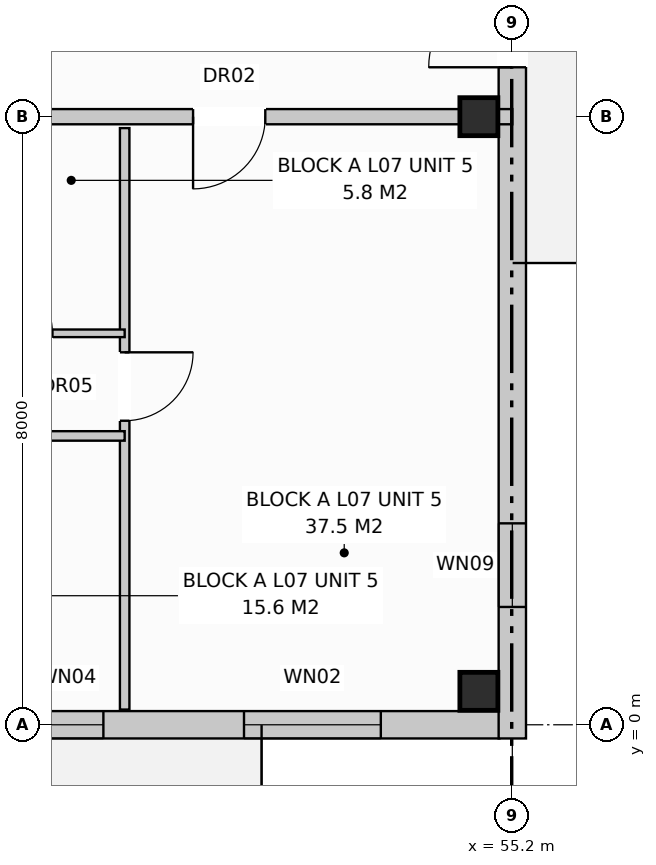
"""IFC4 building model, lengths in metres.
Left out: names, types, materials, properties, quantities, classifications, styles, units other than length and angle.
Written with IfcOpenShell. Run it as: python <this file> out.ifc"""

import sys

from ifc_helpers import new_model, si_unit, direction, frame, frame_2d, origin, origin_with_axes, origin_2d, place, context, subcontext, project, spatial, rectangle, extrude, element, fill, save


model = new_model("IFC4")
c1 = context("Model", 3, precision=1e-05, world=origin(), true_north=direction((0.0, 1.0)))
c2 = subcontext(c1, "Body", "Model", "MODEL_VIEW")
j1 = project(units=[si_unit("LENGTHUNIT", "METRE"), si_unit("PLANEANGLEUNIT", "RADIAN")], contexts=[c1])
p1 = place(None, origin())
s1 = spatial("IfcSite", under=j1, at=p1, CompositionType="ELEMENT")
p2 = place(p1, origin())
s2 = spatial("IfcBuilding", under=s1, at=p2, CompositionType="ELEMENT")
p3 = place(p2, frame((0.0, 0.0, 24.0)))
s3 = spatial("IfcBuildingStorey", under=s2, at=p3, CompositionType="ELEMENT", Elevation=24.0)
for number, where, z_axis, x_axis in (
    (1, (54.76, 0.44, 0.0), (0.0, 0.0, 1.0), (1.0, 0.0, 0.0)),
    (2, (54.76, 8.0, 0.0), (0.0, 0.0, 1.0), (1.0, 0.0, 0.0)),
):
    element("IfcColumn", number, at=place(p3, frame(where, z_axis=z_axis, x_axis=x_axis)), inside=s3, PredefinedType="COLUMN", context=c2, shape_type="SweptSolid", body=[
        extrude(rectangle(XDim=0.5, YDim=0.5, at=origin_2d()), origin(), (0.0, 0.0, 1.0), 3.2),
    ])
p4 = place(p3, frame((0.17, 0.0, 0.0), z_axis=(0.0, 0.0, 1.0), x_axis=(1.0, 0.0, 0.0)))
e3 = element("IfcWall", 3, at=p4, inside=s3, PredefinedType="STANDARD", context=c2, shape_type="SweptSolid", body=[
    extrude(rectangle(XDim=54.86, YDim=0.36, at=frame_2d((27.43, 0.0))), origin(), (0.0, 0.0, 1.0), 2.95),
])
p5 = place(p4, frame((2.5, 0.0, 0.0)))
e4 = element("IfcOpeningElement", 4, at=p5, cuts=e3, PredefinedType="OPENING", context=c2, shape_type="SweptSolid", body=[
    extrude(rectangle(XDim=0.95, YDim=2.1, at=frame_2d((0.475, 1.05))), frame((0.0, 0.192, 0.0), z_axis=(0.0, -1.0, 0.0), x_axis=(1.0, 0.0, 0.0)), (0.0, 0.0, 1.0), 0.384),
])
p6 = place(p4, frame((17.0, 0.0, 0.0)))
e5 = element("IfcOpeningElement", 5, at=p6, cuts=e3, PredefinedType="OPENING", context=c2, shape_type="SweptSolid", body=[
    extrude(rectangle(XDim=0.95, YDim=2.1, at=frame_2d((0.475, 1.05))), frame((0.0, 0.192, 0.0), z_axis=(0.0, -1.0, 0.0), x_axis=(1.0, 0.0, 0.0)), (0.0, 0.0, 1.0), 0.384),
])
p7 = place(p4, frame((30.1, 0.0, 0.0)))
e6 = element("IfcOpeningElement", 6, at=p7, cuts=e3, PredefinedType="OPENING", context=c2, shape_type="SweptSolid", body=[
    extrude(rectangle(XDim=0.95, YDim=2.1, at=frame_2d((0.475, 1.05))), frame((0.0, 0.192, 0.0), z_axis=(0.0, -1.0, 0.0), x_axis=(1.0, 0.0, 0.0)), (0.0, 0.0, 1.0), 0.384),
])
p8 = place(p4, frame((46.5, 0.0, 0.0)))
e7 = element("IfcOpeningElement", 7, at=p8, cuts=e3, PredefinedType="OPENING", context=c2, shape_type="SweptSolid", body=[
    extrude(rectangle(XDim=0.95, YDim=2.1, at=frame_2d((0.475, 1.05))), frame((0.0, 0.192, 0.0), z_axis=(0.0, -1.0, 0.0), x_axis=(1.0, 0.0, 0.0)), (0.0, 0.0, 1.0), 0.384),
])
p9 = place(p4, frame((0.75, 0.0, 0.72)))
e8 = element("IfcOpeningElement", 8, at=p9, cuts=e3, PredefinedType="OPENING", context=c2, shape_type="SweptSolid", body=[
    extrude(rectangle(XDim=1.1, YDim=1.5, at=frame_2d((0.55, 0.75))), frame((0.0, 0.192, 0.0), z_axis=(0.0, -1.0, 0.0), x_axis=(1.0, 0.0, 0.0)), (0.0, 0.0, 1.0), 0.384),
])
p10 = place(p4, frame((4.25, 0.0, 0.72)))
e9 = element("IfcOpeningElement", 9, at=p10, cuts=e3, PredefinedType="OPENING", context=c2, shape_type="SweptSolid", body=[
    extrude(rectangle(XDim=1.9, YDim=1.85, at=frame_2d((0.95, 0.925))), frame((0.0, 0.192, 0.0), z_axis=(0.0, -1.0, 0.0), x_axis=(1.0, 0.0, 0.0)), (0.0, 0.0, 1.0), 0.384),
])
p11 = place(p4, frame((8.925, 0.0, 0.8)))
e10 = element("IfcOpeningElement", 10, at=p11, cuts=e3, PredefinedType="OPENING", context=c2, shape_type="SweptSolid", body=[
    extrude(rectangle(XDim=1.95, YDim=1.65, at=frame_2d((0.975, 0.825))), frame((0.0, 0.192, 0.0), z_axis=(0.0, -1.0, 0.0), x_axis=(1.0, 0.0, 0.0)), (0.0, 0.0, 1.0), 0.384),
])
p12 = place(p4, frame((15.05, 0.0, 0.72)))
e11 = element("IfcOpeningElement", 11, at=p12, cuts=e3, PredefinedType="OPENING", context=c2, shape_type="SweptSolid", body=[
    extrude(rectangle(XDim=1.1, YDim=1.5, at=frame_2d((0.55, 0.75))), frame((0.0, 0.192, 0.0), z_axis=(0.0, -1.0, 0.0), x_axis=(1.0, 0.0, 0.0)), (0.0, 0.0, 1.0), 0.384),
])
p13 = place(p4, frame((21.05, 0.0, 0.72)))
e12 = element("IfcOpeningElement", 12, at=p13, cuts=e3, PredefinedType="OPENING", context=c2, shape_type="SweptSolid", body=[
    extrude(rectangle(XDim=1.9, YDim=1.85, at=frame_2d((0.95, 0.925))), frame((0.0, 0.192, 0.0), z_axis=(0.0, -1.0, 0.0), x_axis=(1.0, 0.0, 0.0)), (0.0, 0.0, 1.0), 0.384),
])
p14 = place(p4, frame((24.85, 0.0, 0.72)))
e13 = element("IfcOpeningElement", 13, at=p14, cuts=e3, PredefinedType="OPENING", context=c2, shape_type="SweptSolid", body=[
    extrude(rectangle(XDim=1.1, YDim=1.5, at=frame_2d((0.55, 0.75))), frame((0.0, 0.192, 0.0), z_axis=(0.0, -1.0, 0.0), x_axis=(1.0, 0.0, 0.0)), (0.0, 0.0, 1.0), 0.384),
])
p15 = place(p4, frame((28.35, 0.0, 0.72)))
e14 = element("IfcOpeningElement", 14, at=p15, cuts=e3, PredefinedType="OPENING", context=c2, shape_type="SweptSolid", body=[
    extrude(rectangle(XDim=1.1, YDim=1.5, at=frame_2d((0.55, 0.75))), frame((0.0, 0.192, 0.0), z_axis=(0.0, -1.0, 0.0), x_axis=(1.0, 0.0, 0.0)), (0.0, 0.0, 1.0), 0.384),
])
p16 = place(p4, frame((31.85, 0.0, 0.72)))
e15 = element("IfcOpeningElement", 15, at=p16, cuts=e3, PredefinedType="OPENING", context=c2, shape_type="SweptSolid", body=[
    extrude(rectangle(XDim=1.9, YDim=1.85, at=frame_2d((0.95, 0.925))), frame((0.0, 0.192, 0.0), z_axis=(0.0, -1.0, 0.0), x_axis=(1.0, 0.0, 0.0)), (0.0, 0.0, 1.0), 0.384),
])
p17 = place(p4, frame((35.525, 0.0, 0.8)))
e16 = element("IfcOpeningElement", 16, at=p17, cuts=e3, PredefinedType="OPENING", context=c2, shape_type="SweptSolid", body=[
    extrude(rectangle(XDim=1.95, YDim=1.65, at=frame_2d((0.975, 0.825))), frame((0.0, 0.192, 0.0), z_axis=(0.0, -1.0, 0.0), x_axis=(1.0, 0.0, 0.0)), (0.0, 0.0, 1.0), 0.384),
])
p18 = place(p4, frame((39.25, 0.0, 0.72)))
e17 = element("IfcOpeningElement", 17, at=p18, cuts=e3, PredefinedType="OPENING", context=c2, shape_type="SweptSolid", body=[
    extrude(rectangle(XDim=1.1, YDim=1.5, at=frame_2d((0.55, 0.75))), frame((0.0, 0.192, 0.0), z_axis=(0.0, -1.0, 0.0), x_axis=(1.0, 0.0, 0.0)), (0.0, 0.0, 1.0), 0.384),
])
p19 = place(p4, frame((42.45, 0.0, 0.8)))
e18 = element("IfcOpeningElement", 18, at=p19, cuts=e3, PredefinedType="OPENING", context=c2, shape_type="SweptSolid", body=[
    extrude(rectangle(XDim=1.9, YDim=1.85, at=frame_2d((0.95, 0.925))), frame((0.0, 0.192, 0.0), z_axis=(0.0, -1.0, 0.0), x_axis=(1.0, 0.0, 0.0)), (0.0, 0.0, 1.0), 0.384),
])
p20 = place(p4, frame((48.7, 0.0, 0.9)))
e19 = element("IfcOpeningElement", 19, at=p20, cuts=e3, PredefinedType="OPENING", context=c2, shape_type="SweptSolid", body=[
    extrude(rectangle(XDim=0.95, YDim=1.55, at=frame_2d((0.475, 0.775))), frame((0.0, 0.192, 0.0), z_axis=(0.0, -1.0, 0.0), x_axis=(1.0, 0.0, 0.0)), (0.0, 0.0, 1.0), 0.384),
])
p21 = place(p4, frame((51.5, 0.0, 0.8)))
e20 = element("IfcOpeningElement", 20, at=p21, cuts=e3, PredefinedType="OPENING", context=c2, shape_type="SweptSolid", body=[
    extrude(rectangle(XDim=1.8, YDim=1.7, at=frame_2d((0.9, 0.85))), frame((0.0, 0.192, 0.0), z_axis=(0.0, -1.0, 0.0), x_axis=(1.0, 0.0, 0.0)), (0.0, 0.0, 1.0), 0.384),
])
p22 = place(p3, frame((55.2, -0.18, 0.0), z_axis=(0.0, 0.0, 1.0), x_axis=(0.0, 1.0, 0.0)))
e21 = element("IfcWall", 21, at=p22, inside=s3, PredefinedType="STANDARD", context=c2, shape_type="SweptSolid", body=[
    extrude(rectangle(XDim=18.76, YDim=0.36, at=frame_2d((9.38, 0.0))), origin(), (0.0, 0.0, 1.0), 2.95),
])
p23 = place(p22, frame((8.83, 0.0, 0.0)))
e22 = element("IfcOpeningElement", 22, at=p23, cuts=e21, PredefinedType="OPENING", context=c2, shape_type="SweptSolid", body=[
    extrude(rectangle(XDim=1.1, YDim=2.1, at=frame_2d((0.55, 1.05))), frame((0.0, 0.192, 0.0), z_axis=(0.0, -1.0, 0.0), x_axis=(1.0, 0.0, 0.0)), (0.0, 0.0, 1.0), 0.384),
])
p24 = place(p22, frame((1.73, 0.0, 0.72)))
e23 = element("IfcOpeningElement", 23, at=p24, cuts=e21, PredefinedType="OPENING", context=c2, shape_type="SweptSolid", body=[
    extrude(rectangle(XDim=1.1, YDim=1.5, at=frame_2d((0.55, 0.75))), frame((0.0, 0.192, 0.0), z_axis=(0.0, -1.0, 0.0), x_axis=(1.0, 0.0, 0.0)), (0.0, 0.0, 1.0), 0.384),
])
p25 = place(p22, frame((15.93, 0.0, 0.72)))
e24 = element("IfcOpeningElement", 24, at=p25, cuts=e21, PredefinedType="OPENING", context=c2, shape_type="SweptSolid", body=[
    extrude(rectangle(XDim=1.1, YDim=1.5, at=frame_2d((0.55, 0.75))), frame((0.0, 0.192, 0.0), z_axis=(0.0, -1.0, 0.0), x_axis=(1.0, 0.0, 0.0)), (0.0, 0.0, 1.0), 0.384),
])
p26 = place(p3, frame((41.4, 8.0, 0.0), z_axis=(0.0, 0.0, 1.0), x_axis=(1.0, 0.0, 0.0)))
e25 = element("IfcWall", 25, at=p26, inside=s3, PredefinedType="PARTITIONING", context=c2, shape_type="SweptSolid", body=[
    extrude(rectangle(XDim=13.8, YDim=0.2, at=frame_2d((6.9, 0.0))), origin(), (0.0, 0.0, 1.0), 2.39),
])
p27 = place(p26, frame((9.6, 0.0, 0.0)))
e26 = element("IfcOpeningElement", 26, at=p27, cuts=e25, PredefinedType="OPENING", context=c2, shape_type="SweptSolid", body=[
    extrude(rectangle(XDim=0.95, YDim=2.15, at=frame_2d((0.475, 1.075))), frame((0.0, 0.112, 0.0), z_axis=(0.0, -1.0, 0.0), x_axis=(1.0, 0.0, 0.0)), (0.0, 0.0, 1.0), 0.224),
])
p28 = place(p3, frame((50.1, 7.85, 0.0), z_axis=(0.0, 0.0, 1.0), x_axis=(0.0, -1.0, 0.0)))
e27 = element("IfcWall", 27, at=p28, inside=s3, PredefinedType="PARTITIONING", context=c2, shape_type="SweptSolid", body=[
    extrude(rectangle(XDim=7.65, YDim=0.125, at=frame_2d((3.825, 0.0))), origin(), (0.0, 0.0, 1.0), 2.95),
])
p29 = place(p28, frame((2.95, 0.0, 0.0)))
e28 = element("IfcOpeningElement", 28, at=p29, cuts=e27, PredefinedType="OPENING", context=c2, shape_type="SweptSolid", body=[
    extrude(rectangle(XDim=0.9, YDim=2.1, at=frame_2d((0.45, 1.05))), frame((0.0, 0.074, 0.0), z_axis=(0.0, -1.0, 0.0), x_axis=(1.0, 0.0, 0.0)), (0.0, 0.0, 1.0), 0.149),
])
p30 = place(p3, frame((41.5, 5.15, 0.0), z_axis=(0.0, 0.0, 1.0), x_axis=(1.0, 0.0, 0.0)))
e29 = element("IfcWall", 29, at=p30, inside=s3, PredefinedType="PARTITIONING", context=c2, shape_type="SweptSolid", body=[
    extrude(rectangle(XDim=8.6, YDim=0.1, at=frame_2d((4.3, 0.0))), origin(), (0.0, 0.0, 1.0), 2.95),
])
p31 = place(p30, frame((1.4, 0.0, 0.0)))
e30 = element("IfcOpeningElement", 30, at=p31, cuts=e29, PredefinedType="OPENING", context=c2, shape_type="SweptSolid", body=[
    extrude(rectangle(XDim=0.85, YDim=2.05, at=frame_2d((0.425, 1.025))), frame((0.0, 0.062, 0.0), z_axis=(0.0, -1.0, 0.0), x_axis=(1.0, 0.0, 0.0)), (0.0, 0.0, 1.0), 0.124),
])
p32 = place(p30, frame((4.65, 0.0, 0.0)))
e31 = element("IfcOpeningElement", 31, at=p32, cuts=e29, PredefinedType="OPENING", context=c2, shape_type="SweptSolid", body=[
    extrude(rectangle(XDim=0.85, YDim=2.05, at=frame_2d((0.425, 1.025))), frame((0.0, 0.062, 0.0), z_axis=(0.0, -1.0, 0.0), x_axis=(1.0, 0.0, 0.0)), (0.0, 0.0, 1.0), 0.124),
])
p33 = place(p30, frame((6.8, 0.0, 0.0)))
e32 = element("IfcOpeningElement", 32, at=p33, cuts=e29, PredefinedType="OPENING", context=c2, shape_type="SweptSolid", body=[
    extrude(rectangle(XDim=0.85, YDim=2.1, at=frame_2d((0.425, 1.05))), frame((0.0, 0.062, 0.0), z_axis=(0.0, -1.0, 0.0), x_axis=(1.0, 0.0, 0.0)), (0.0, 0.0, 1.0), 0.124),
])
p34 = place(p3, frame((45.6, 3.8, 0.0), z_axis=(0.0, 0.0, 1.0), x_axis=(1.0, 0.0, 0.0)))
e33 = element("IfcWall", 33, at=p34, inside=s3, PredefinedType="PARTITIONING", context=c2, shape_type="SweptSolid", body=[
    extrude(rectangle(XDim=4.5, YDim=0.125, at=frame_2d((2.25, 0.0))), origin(), (0.0, 0.0, 1.0), 2.95),
])
p35 = place(p34, frame((1.6, 0.0, 0.0)))
e34 = element("IfcOpeningElement", 34, at=p35, cuts=e33, PredefinedType="OPENING", context=c2, shape_type="SweptSolid", body=[
    extrude(rectangle(XDim=0.9, YDim=2.1, at=frame_2d((0.45, 1.05))), frame((0.0, 0.074, 0.0), z_axis=(0.0, -1.0, 0.0), x_axis=(1.0, 0.0, 0.0)), (0.0, 0.0, 1.0), 0.149),
])
p36 = place(p20, origin_with_axes())
e35 = element("IfcWindow", 35, at=p36, inside=s3, PartitioningType="SINGLE_PANEL", PredefinedType="WINDOW", context=c2, shape_type="SweptSolid", body=[
    extrude(rectangle(XDim=0.95, YDim=1.55, at=frame_2d((0.475, 0.775))), frame((0.0, 0.03, 0.0), z_axis=(0.0, -1.0, 0.0), x_axis=(1.0, 0.0, 0.0)), (0.0, 0.0, 1.0), 0.06),
])
fill(e19, e35)
p37 = place(p21, origin_with_axes())
e36 = element("IfcWindow", 36, at=p37, inside=s3, PartitioningType="SINGLE_PANEL", PredefinedType="WINDOW", context=c2, shape_type="SweptSolid", body=[
    extrude(rectangle(XDim=1.8, YDim=1.7, at=frame_2d((0.9, 0.85))), frame((0.0, 0.03, 0.0), z_axis=(0.0, -1.0, 0.0), x_axis=(1.0, 0.0, 0.0)), (0.0, 0.0, 1.0), 0.06),
])
fill(e20, e36)
p38 = place(p23, origin_with_axes())
e37 = element("IfcDoor", 37, at=p38, inside=s3, OperationType="SINGLE_SWING_LEFT", PredefinedType="DOOR", context=c2, shape_type="SweptSolid", body=[
    extrude(rectangle(XDim=1.1, YDim=2.1, at=frame_2d((0.55, 1.05))), frame((0.0, 0.025, 0.0), z_axis=(0.0, -1.0, 0.0), x_axis=(1.0, 0.0, 0.0)), (0.0, 0.0, 1.0), 0.05),
])
fill(e22, e37)
p39 = place(p24, origin_with_axes())
e38 = element("IfcWindow", 38, at=p39, inside=s3, PartitioningType="SINGLE_PANEL", PredefinedType="WINDOW", context=c2, shape_type="SweptSolid", body=[
    extrude(rectangle(XDim=1.1, YDim=1.5, at=frame_2d((0.55, 0.75))), frame((0.0, 0.03, 0.0), z_axis=(0.0, -1.0, 0.0), x_axis=(1.0, 0.0, 0.0)), (0.0, 0.0, 1.0), 0.06),
])
fill(e23, e38)
p40 = place(p27, frame((0.95, 0.0, 0.0), z_axis=(0.0, 0.0, 1.0), x_axis=(-1.0, 0.0, 0.0)))
e39 = element("IfcDoor", 39, at=p40, inside=s3, OperationType="SINGLE_SWING_LEFT", PredefinedType="DOOR", context=c2, shape_type="SweptSolid", body=[
    extrude(rectangle(XDim=0.95, YDim=2.15, at=frame_2d((0.475, 1.075))), frame((0.0, 0.025, 0.0), z_axis=(0.0, -1.0, 0.0), x_axis=(1.0, 0.0, 0.0)), (0.0, 0.0, 1.0), 0.05),
])
fill(e26, e39)
p41 = place(p29, origin_with_axes())
e40 = element("IfcDoor", 40, at=p41, inside=s3, OperationType="SINGLE_SWING_LEFT", PredefinedType="DOOR", context=c2, shape_type="SweptSolid", body=[
    extrude(rectangle(XDim=0.9, YDim=2.1, at=frame_2d((0.45, 1.05))), frame((0.0, 0.025, 0.0), z_axis=(0.0, -1.0, 0.0), x_axis=(1.0, 0.0, 0.0)), (0.0, 0.0, 1.0), 0.05),
])
fill(e28, e40)
p42 = place(p33, origin_with_axes())
e41 = element("IfcDoor", 41, at=p42, inside=s3, OperationType="SINGLE_SWING_LEFT", PredefinedType="DOOR", context=c2, shape_type="SweptSolid", body=[
    extrude(rectangle(XDim=0.85, YDim=2.1, at=frame_2d((0.425, 1.05))), frame((0.0, 0.025, 0.0), z_axis=(0.0, -1.0, 0.0), x_axis=(1.0, 0.0, 0.0)), (0.0, 0.0, 1.0), 0.05),
])
fill(e32, e41)
save(model, sys.argv[1])
